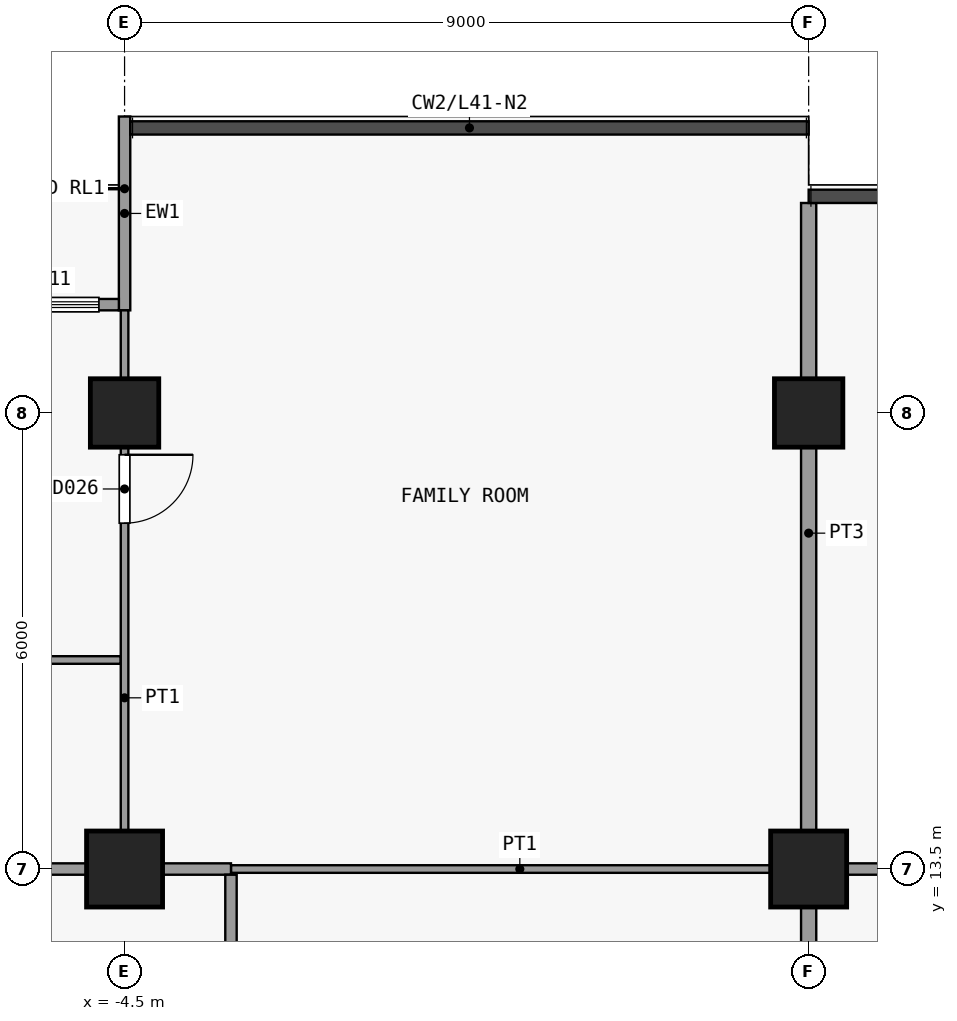
"""IFC4 building model, lengths in metres.
Left out: names, types, materials, properties, quantities, classifications, styles, units other than length and angle.
Written with IfcOpenShell. Run it as: python <this file> out.ifc"""

import sys

from ifc_helpers import new_model, si_unit, direction, frame, frame_2d, origin, origin_2d, place, context, subcontext, project, spatial, rectangle, extrude, element, fill, save


model = new_model("IFC4")
c1 = context("Model", 3, precision=1e-05, world=origin(), true_north=direction((0.0, 1.0)))
c2 = subcontext(c1, "Body", "Model", "MODEL_VIEW")
j1 = project(units=[si_unit("LENGTHUNIT", "METRE"), si_unit("PLANEANGLEUNIT", "RADIAN")], contexts=[c1])
p1 = place(None, origin())
s1 = spatial("IfcSite", under=j1, at=p1, CompositionType="ELEMENT")
p2 = place(p1, origin())
s2 = spatial("IfcBuilding", under=s1, at=p2, CompositionType="ELEMENT")
p3 = place(p2, frame((0.0, 0.0, 167.3)))
s3 = spatial("IfcBuildingStorey", under=s2, at=p3, CompositionType="ELEMENT", Elevation=167.3)
p4 = place(p3, frame((-4.5, 13.5, 0.0), z_axis=(0.0, 0.0, 1.0), x_axis=(1.0, 0.0, 0.0)))
e1 = element("IfcColumn", 1, at=p4, inside=s3, PredefinedType="COLUMN", context=c2, shape_type="SweptSolid", body=[
    extrude(rectangle(XDim=1.0, YDim=1.0, at=origin_2d()), origin(), (0.0, 0.0, 1.0), 3.6),
])
p5 = place(p3, frame((-4.5, 19.5, 0.0), z_axis=(0.0, 0.0, 1.0), x_axis=(1.0, 0.0, 0.0)))
e2 = element("IfcColumn", 2, at=p5, inside=s3, PredefinedType="COLUMN", context=c2, shape_type="SweptSolid", body=[
    extrude(rectangle(XDim=0.9, YDim=0.9, at=origin_2d()), origin(), (0.0, 0.0, 1.0), 3.6),
])
p6 = place(p3, frame((4.5, 13.5, 0.0), z_axis=(0.0, 0.0, 1.0), x_axis=(1.0, 0.0, 0.0)))
e3 = element("IfcColumn", 3, at=p6, inside=s3, PredefinedType="COLUMN", context=c2, shape_type="SweptSolid", body=[
    extrude(rectangle(XDim=1.0, YDim=1.0, at=origin_2d()), origin(), (0.0, 0.0, 1.0), 3.6),
])
p7 = place(p3, frame((4.5, 19.5, 0.0), z_axis=(0.0, 0.0, 1.0), x_axis=(1.0, 0.0, 0.0)))
e4 = element("IfcColumn", 4, at=p7, inside=s3, PredefinedType="COLUMN", context=c2, shape_type="SweptSolid", body=[
    extrude(rectangle(XDim=0.9, YDim=0.9, at=origin_2d()), origin(), (0.0, 0.0, 1.0), 3.6),
])
p8 = place(p3, frame((-4.5, 20.85, 0.0), z_axis=(0.0, 0.0, 1.0), x_axis=(0.0, 1.0, 0.0)))
e5 = element("IfcWall", 5, at=p8, inside=s3, PredefinedType="SOLIDWALL", context=c2, shape_type="SweptSolid", body=[
    extrude(rectangle(XDim=2.55, YDim=0.15, at=frame_2d((1.275, 0.0))), origin(), (0.0, 0.0, 1.0), 3.3),
])
p9 = place(p3, frame((-10.425, 20.925, 0.0), z_axis=(0.0, 0.0, 1.0), x_axis=(1.0, 0.0, 0.0)))
e6 = element("IfcWall", 6, at=p9, inside=s3, PredefinedType="SOLIDWALL", context=c2, shape_type="SweptSolid", body=[
    extrude(rectangle(XDim=5.85, YDim=0.15, at=frame_2d((2.925, 0.0))), origin(), (0.0, 0.0, 1.0), 3.3),
])
p10 = place(p9, frame((2.325, 0.0, 0.0)))
e7 = element("IfcOpeningElement", 7, at=p10, cuts=e6, PredefinedType="OPENING", context=c2, shape_type="SweptSolid", body=[
    extrude(rectangle(XDim=1.2, YDim=2.4, at=frame_2d((0.6, 1.2))), frame((0.0, 0.085, 0.0), z_axis=(0.0, -1.0, 0.0), x_axis=(1.0, 0.0, 0.0)), (0.0, 0.0, 1.0), 0.17),
])
p11 = place(p9, frame((0.262, 0.0, 0.9)))
e8 = element("IfcOpeningElement", 8, at=p11, cuts=e6, PredefinedType="OPENING", context=c2, shape_type="SweptSolid", body=[
    extrude(rectangle(XDim=1.8, YDim=2.1, at=frame_2d((0.9, 1.05))), frame((0.0, 0.085, 0.0), z_axis=(0.0, -1.0, 0.0), x_axis=(1.0, 0.0, 0.0)), (0.0, 0.0, 1.0), 0.17),
])
p12 = place(p9, frame((3.788, 0.0, 0.9)))
e9 = element("IfcOpeningElement", 9, at=p12, cuts=e6, PredefinedType="OPENING", context=c2, shape_type="SweptSolid", body=[
    extrude(rectangle(XDim=1.8, YDim=2.1, at=frame_2d((0.9, 1.05))), frame((0.0, 0.085, 0.0), z_axis=(0.0, -1.0, 0.0), x_axis=(1.0, 0.0, 0.0)), (0.0, 0.0, 1.0), 0.17),
])
p13 = place(p3, frame((-3.1, 13.5, 0.0), z_axis=(0.0, 0.0, 1.0), x_axis=(1.0, 0.0, 0.0)))
e10 = element("IfcWall", 10, at=p13, inside=s3, PredefinedType="PARTITIONING", context=c2, shape_type="SweptSolid", body=[
    extrude(rectangle(XDim=7.6, YDim=0.1, at=frame_2d((3.8, 0.0))), origin(), (0.0, 0.0, 1.0), 3.3),
])
p14 = place(p3, frame((-10.5, 13.5, 0.0), z_axis=(0.0, 0.0, 1.0), x_axis=(1.0, 0.0, 0.0)))
e11 = element("IfcWall", 11, at=p14, inside=s3, PredefinedType="PARTITIONING", context=c2, shape_type="SweptSolid", body=[
    extrude(rectangle(XDim=7.4, YDim=0.15, at=frame_2d((3.7, 0.0))), origin(), (0.0, 0.0, 1.0), 3.3),
])
p15 = place(p3, frame((4.5, 13.5, 0.0), z_axis=(0.0, 0.0, 1.0), x_axis=(1.0, 0.0, 0.0)))
e12 = element("IfcWall", 12, at=p15, inside=s3, PredefinedType="PARTITIONING", context=c2, shape_type="SweptSolid", body=[
    extrude(rectangle(XDim=2.5, YDim=0.15, at=frame_2d((1.25, 0.0))), origin(), (0.0, 0.0, 1.0), 3.3),
])
p16 = place(p3, frame((-10.45, 16.25, 0.0), z_axis=(0.0, 0.0, 1.0), x_axis=(1.0, 0.0, 0.0)))
e13 = element("IfcWall", 13, at=p16, inside=s3, PredefinedType="PARTITIONING", context=c2, shape_type="SweptSolid", body=[
    extrude(rectangle(XDim=5.9, YDim=0.1, at=frame_2d((2.95, 0.0))), origin(), (0.0, 0.0, 1.0), 3.3),
])
p17 = place(p16, frame((2.5, 0.0, 0.0)))
e14 = element("IfcOpeningElement", 14, at=p17, cuts=e13, PredefinedType="OPENING", context=c2, shape_type="SweptSolid", body=[
    extrude(rectangle(XDim=0.9, YDim=2.1, at=frame_2d((0.45, 1.05))), frame((0.0, 0.06, 0.0), z_axis=(0.0, -1.0, 0.0), x_axis=(1.0, 0.0, 0.0)), (0.0, 0.0, 1.0), 0.12),
])
p18 = place(p3, frame((-4.5, 13.575, 0.0), z_axis=(0.0, 0.0, 1.0), x_axis=(0.0, 1.0, 0.0)))
e15 = element("IfcWall", 15, at=p18, inside=s3, PredefinedType="PARTITIONING", context=c2, shape_type="SweptSolid", body=[
    extrude(rectangle(XDim=7.275, YDim=0.1, at=frame_2d((3.638, 0.0))), origin(), (0.0, 0.0, 1.0), 3.3),
])
p19 = place(p18, frame((4.475, 0.0, 0.0)))
e16 = element("IfcOpeningElement", 16, at=p19, cuts=e15, PredefinedType="OPENING", context=c2, shape_type="SweptSolid", body=[
    extrude(rectangle(XDim=0.9, YDim=2.1, at=frame_2d((0.45, 1.05))), frame((0.0, 0.06, 0.0), z_axis=(0.0, -1.0, 0.0), x_axis=(1.0, 0.0, 0.0)), (0.0, 0.0, 1.0), 0.12),
])
p20 = place(p3, frame((-3.1, 10.6, 0.0), z_axis=(0.0, 0.0, 1.0), x_axis=(0.0, 1.0, 0.0)))
e17 = element("IfcWall", 17, at=p20, inside=s3, PredefinedType="PARTITIONING", context=c2, shape_type="SweptSolid", body=[
    extrude(rectangle(XDim=2.825, YDim=0.15, at=frame_2d((1.413, 0.0))), origin(), (0.0, 0.0, 1.0), 3.3),
])
p21 = place(p20, frame((1.0, 0.0, 0.0)))
e18 = element("IfcOpeningElement", 18, at=p21, cuts=e17, PredefinedType="OPENING", context=c2, shape_type="SweptSolid", body=[
    extrude(rectangle(XDim=0.9, YDim=2.1, at=frame_2d((0.45, 1.05))), frame((0.0, 0.085, 0.0), z_axis=(0.0, -1.0, 0.0), x_axis=(1.0, 0.0, 0.0)), (0.0, 0.0, 1.0), 0.17),
])
p22 = place(p3, frame((4.5, 10.6, 0.0), z_axis=(0.0, 0.0, 1.0), x_axis=(0.0, 1.0, 0.0)))
e19 = element("IfcWall", 19, at=p22, inside=s3, PredefinedType="PARTITIONING", context=c2, shape_type="SweptSolid", body=[
    extrude(rectangle(XDim=2.825, YDim=0.2, at=frame_2d((1.413, 0.0))), origin(), (0.0, 0.0, 1.0), 3.3),
])
p23 = place(p3, frame((4.5, 13.575, 0.0), z_axis=(0.0, 0.0, 1.0), x_axis=(0.0, 1.0, 0.0)))
e20 = element("IfcWall", 20, at=p23, inside=s3, PredefinedType="PARTITIONING", context=c2, shape_type="SweptSolid", body=[
    extrude(rectangle(XDim=8.688, YDim=0.2, at=frame_2d((4.344, 0.0))), origin(), (0.0, 0.0, 1.0), 3.3),
])
p24 = place(p12, origin())
e21 = element("IfcWindow", 21, at=p24, inside=s3, PartitioningType="SINGLE_PANEL", PredefinedType="WINDOW", context=c2, shape_type="SweptSolid", body=[
    extrude(rectangle(XDim=1.8, YDim=2.1, at=frame_2d((0.9, 1.05))), frame((0.0, 0.03, 0.0), z_axis=(0.0, -1.0, 0.0), x_axis=(1.0, 0.0, 0.0)), (0.0, 0.0, 1.0), 0.06),
])
fill(e9, e21)
p25 = place(p19, origin())
e22 = element("IfcDoor", 22, at=p25, inside=s3, OperationType="SINGLE_SWING_RIGHT", PredefinedType="DOOR", context=c2, shape_type="SweptSolid", body=[
    extrude(rectangle(XDim=0.9, YDim=2.1, at=frame_2d((0.45, 1.05))), frame((0.0, 0.025, 0.0), z_axis=(0.0, -1.0, 0.0), x_axis=(1.0, 0.0, 0.0)), (0.0, 0.0, 1.0), 0.05),
])
fill(e16, e22)
save(model, sys.argv[1])
